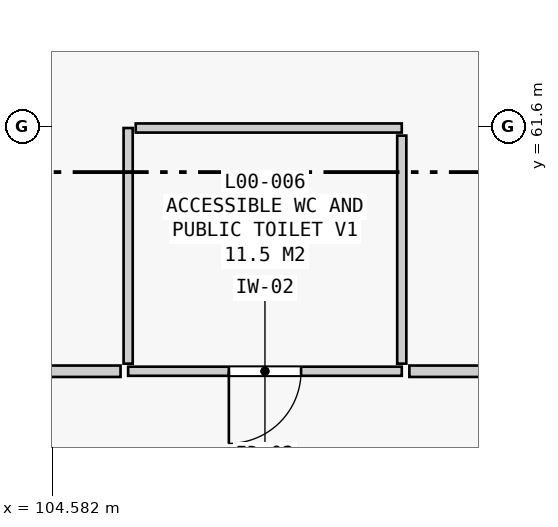
"""IFC4 building model, lengths in metres.
Left out: names, types, materials, properties, quantities, classifications, styles, units other than length and angle.
Written with IfcOpenShell. Run it as: python <this file> out.ifc"""

import sys

from ifc_helpers import new_model, si_unit, direction, frame, frame_2d, origin, place, context, subcontext, project, spatial, rectangle, extrude, element, fill, save


model = new_model("IFC4")
c1 = context("Model", 3, precision=1e-05, world=origin(), true_north=direction((0.0, 1.0)))
c2 = subcontext(c1, "Body", "Model", "MODEL_VIEW")
j1 = project(units=[si_unit("LENGTHUNIT", "METRE"), si_unit("PLANEANGLEUNIT", "RADIAN")], contexts=[c1])
p1 = place(None, origin())
s1 = spatial("IfcSite", under=j1, at=p1, CompositionType="ELEMENT")
p2 = place(p1, origin())
s2 = spatial("IfcBuilding", under=s1, at=p2, CompositionType="ELEMENT")
p3 = place(p2, origin())
s3 = spatial("IfcBuildingStorey", under=s2, at=p3, CompositionType="ELEMENT", Elevation=0.0)
p4 = place(p3, frame((109.18, 58.38, 0.0), z_axis=(0.0, 0.0, 1.0), x_axis=(-1.0, 0.0, 0.0)))
e1 = element("IfcWall", 1, at=p4, inside=s3, PredefinedType="PARTITIONING", context=c2, shape_type="SweptSolid", body=[
    extrude(rectangle(XDim=3.6, YDim=0.12, at=frame_2d((1.8, 0.0))), origin(), (0.0, 0.0, 1.0), 5.14),
])
p5 = place(p4, frame((1.325, 0.0, 0.0)))
e2 = element("IfcOpeningElement", 2, at=p5, cuts=e1, PredefinedType="OPENING", context=c2, shape_type="SweptSolid", body=[
    extrude(rectangle(XDim=0.95, YDim=2.15, at=frame_2d((0.475, 1.075))), frame((0.0, 0.07, 0.0), z_axis=(0.0, -1.0, 0.0), x_axis=(1.0, 0.0, 0.0)), (0.0, 0.0, 1.0), 0.14),
])
p6 = place(p3, frame((105.58, 58.48, 0.0), z_axis=(0.0, 0.0, 1.0), x_axis=(0.0, 1.0, 0.0)))
e3 = element("IfcWall", 3, at=p6, inside=s3, PredefinedType="PARTITIONING", context=c2, shape_type="SweptSolid", body=[
    extrude(rectangle(XDim=3.1, YDim=0.12, at=frame_2d((1.55, 0.0))), origin(), (0.0, 0.0, 1.0), 4.47),
])
p7 = place(p3, frame((105.68, 61.58, 0.0), z_axis=(0.0, 0.0, 1.0), x_axis=(1.0, 0.0, 0.0)))
e4 = element("IfcWall", 4, at=p7, inside=s3, PredefinedType="PARTITIONING", context=c2, shape_type="SweptSolid", body=[
    extrude(rectangle(XDim=3.5, YDim=0.12, at=frame_2d((1.75, 0.0))), origin(), (0.0, 0.0, 1.0), 4.47),
])
p8 = place(p3, frame((109.18, 61.48, 0.0), z_axis=(0.0, 0.0, 1.0), x_axis=(0.0, -1.0, 0.0)))
e5 = element("IfcWall", 5, at=p8, inside=s3, PredefinedType="PARTITIONING", context=c2, shape_type="SweptSolid", body=[
    extrude(rectangle(XDim=3.0, YDim=0.12, at=frame_2d((1.5, 0.0))), origin(), (0.0, 0.0, 1.0), 4.47),
])
p9 = place(p3, frame((111.85, 58.38, 0.0), z_axis=(0.0, 0.0, 1.0), x_axis=(-1.0, 0.0, 0.0)))
e6 = element("IfcWall", 6, at=p9, inside=s3, PredefinedType="PARTITIONING", context=c2, shape_type="SweptSolid", body=[
    extrude(rectangle(XDim=2.57, YDim=0.15, at=frame_2d((1.285, 0.0))), origin(), (0.0, 0.0, 1.0), 4.47),
])
p10 = place(p3, frame((105.48, 58.38, 0.0), z_axis=(0.0, 0.0, 1.0), x_axis=(-1.0, 0.0, 0.0)))
e7 = element("IfcWall", 7, at=p10, inside=s3, PredefinedType="PARTITIONING", context=c2, shape_type="SweptSolid", body=[
    extrude(rectangle(XDim=19.72, YDim=0.15, at=frame_2d((9.86, 0.0))), origin(), (0.0, 0.0, 1.0), 4.47),
])
p11 = place(p10, frame((8.96, 0.0, 0.0)))
e8 = element("IfcOpeningElement", 8, at=p11, cuts=e7, PredefinedType="OPENING", context=c2, shape_type="SweptSolid", body=[
    extrude(rectangle(XDim=1.8, YDim=2.2, at=frame_2d((0.9, 1.1))), frame((0.0, 0.085, 0.0), z_axis=(0.0, -1.0, 0.0), x_axis=(1.0, 0.0, 0.0)), (0.0, 0.0, 1.0), 0.17),
])
p12 = place(p10, frame((14.187, 0.0, 1.05)))
e9 = element("IfcOpeningElement", 9, at=p12, cuts=e7, PredefinedType="OPENING", context=c2, shape_type="SweptSolid", body=[
    extrude(rectangle(XDim=1.6, YDim=1.5, at=frame_2d((0.8, 0.75))), frame((0.0, 0.085, 0.0), z_axis=(0.0, -1.0, 0.0), x_axis=(1.0, 0.0, 0.0)), (0.0, 0.0, 1.0), 0.17),
])
p13 = place(p5, origin())
e10 = element("IfcDoor", 10, at=p13, inside=s3, OperationType="SINGLE_SWING_RIGHT", PredefinedType="DOOR", context=c2, shape_type="SweptSolid", body=[
    extrude(rectangle(XDim=0.95, YDim=2.15, at=frame_2d((0.475, 1.075))), frame((0.0, 0.025, 0.0), z_axis=(0.0, -1.0, 0.0), x_axis=(1.0, 0.0, 0.0)), (0.0, 0.0, 1.0), 0.05),
])
fill(e2, e10)
save(model, sys.argv[1])
